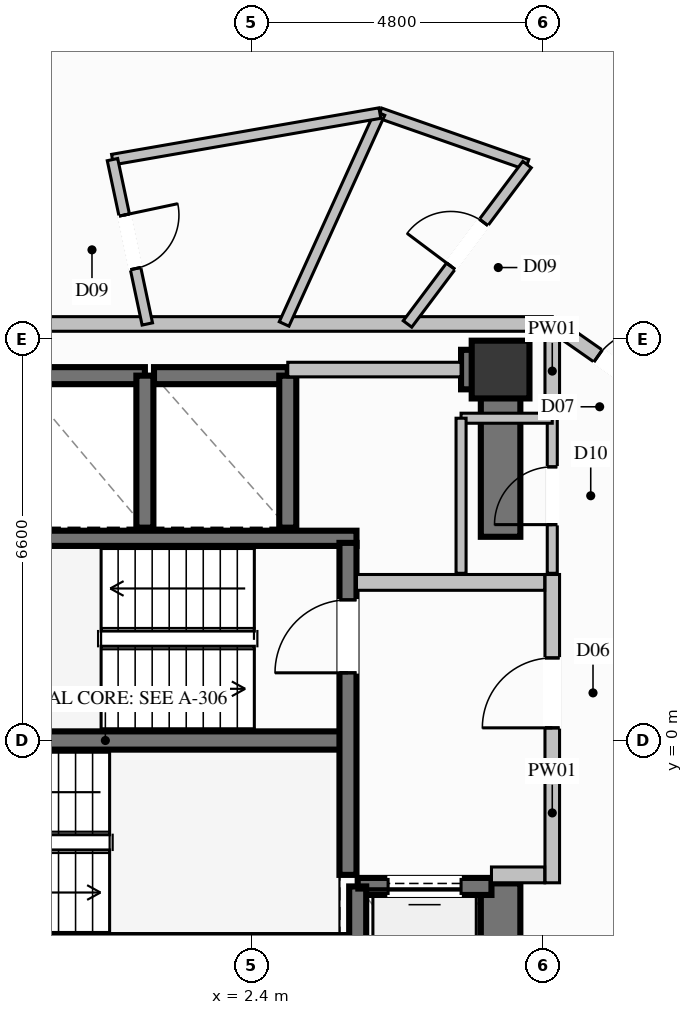
"""IFC4 building model, lengths in metres.
Left out: names, types, materials, properties, quantities, classifications, styles, units other than length and angle.
Written with IfcOpenShell. Run it as: python <this file> out.ifc"""

import sys

from ifc_helpers import new_model, si_unit, direction, frame, frame_2d, origin, origin_2d, place, context, subcontext, project, spatial, rectangle, extrude, element, fill, save


model = new_model("IFC4")
c1 = context("Model", 3, precision=1e-05, world=origin(), true_north=direction((0.0, 1.0)))
c2 = subcontext(c1, "Body", "Model", "MODEL_VIEW")
j1 = project(units=[si_unit("LENGTHUNIT", "METRE"), si_unit("PLANEANGLEUNIT", "RADIAN")], contexts=[c1])
p1 = place(None, origin())
s1 = spatial("IfcSite", under=j1, at=p1, CompositionType="ELEMENT")
p2 = place(p1, origin())
s2 = spatial("IfcBuilding", under=s1, at=p2, CompositionType="ELEMENT")
p3 = place(p2, frame((0.0, 0.0, 142.2)))
s3 = spatial("IfcBuildingStorey", under=s2, at=p3, CompositionType="ELEMENT", Elevation=142.2)
p4 = place(p3, frame((6.5, 6.1, 0.0), z_axis=(0.0, 0.0, 1.0), x_axis=(1.0, 0.0, 0.0)))
e1 = element("IfcColumn", 1, at=p4, inside=s3, PredefinedType="COLUMN", context=c2, shape_type="SweptSolid", body=[
    extrude(rectangle(XDim=0.95, YDim=0.95, at=origin_2d()), origin(), (0.0, 0.0, 1.0), 3.6),
])
p5 = place(p3, frame((-3.99, 0.0, 0.0), z_axis=(0.0, 0.0, 1.0), x_axis=(1.0, 0.0, 0.0)))
e2 = element("IfcWall", 2, at=p5, inside=s3, PredefinedType="SHEAR", context=c2, shape_type="SweptSolid", body=[
    extrude(rectangle(XDim=7.98, YDim=0.3, at=frame_2d((3.99, 0.0))), origin(), (0.0, 0.0, 1.0), 3.6),
])
for number, where, z_axis, x_axis in (
    (3, (-4.13, -3.325, 0.0), (0.0, 0.0, 1.0), (1.0, 0.0, 0.0)),
    (4, (-4.13, 3.325, 0.0), (0.0, 0.0, 1.0), (1.0, 0.0, 0.0)),
):
    element("IfcWall", number, at=place(p3, frame(where, z_axis=z_axis, x_axis=x_axis)), inside=s3, PredefinedType="SOLIDWALL", context=c2, shape_type="SweptSolid", body=[
        extrude(rectangle(XDim=8.26, YDim=0.25, at=frame_2d((4.13, 0.0))), origin(), (0.0, 0.0, 1.0), 3.6),
    ])
p6 = place(p3, frame((5.85, 6.1, 0.0), z_axis=(0.0, 0.0, 1.0), x_axis=(1.0, 0.0, 0.0)))
e5 = element("IfcWall", 5, at=p6, inside=s3, PredefinedType="SHEAR", context=c2, shape_type="SweptSolid", body=[
    extrude(rectangle(XDim=0.325, YDim=0.65, at=frame_2d((0.163, 0.0))), origin(), (0.0, 0.0, 1.0), 3.6),
])
p7 = place(p3, frame((6.5, -6.425, 0.0), z_axis=(0.0, 0.0, 1.0), x_axis=(0.0, 1.0, 0.0)))
e6 = element("IfcWall", 6, at=p7, inside=s3, PredefinedType="SHEAR", context=c2, shape_type="SweptSolid", body=[
    extrude(rectangle(XDim=4.075, YDim=0.65, at=frame_2d((2.038, 0.0))), origin(), (0.0, 0.0, 1.0), 3.6),
])
p8 = place(p3, frame((6.5, 3.35, 0.0), z_axis=(0.0, 0.0, 1.0), x_axis=(0.0, 1.0, 0.0)))
e7 = element("IfcWall", 7, at=p8, inside=s3, PredefinedType="SHEAR", context=c2, shape_type="SweptSolid", body=[
    extrude(rectangle(XDim=3.075, YDim=0.65, at=frame_2d((1.538, 0.0))), origin(), (0.0, 0.0, 1.0), 3.6),
])
p9 = place(p3, frame((0.65, 6.0, 0.0), z_axis=(0.0, 0.0, 1.0), x_axis=(-1.0, 0.0, 0.0)))
e8 = element("IfcWall", 8, at=p9, inside=s3, PredefinedType="SOLIDWALL", context=c2, shape_type="SweptSolid", body=[
    extrude(rectangle(XDim=2.1, YDim=0.28, at=frame_2d((1.05, 0.0))), origin(), (0.0, 0.0, 1.0), 3.35),
])
p10 = place(p3, frame((0.65, 3.5, 0.0), z_axis=(0.0, 0.0, 1.0), x_axis=(0.0, 1.0, 0.0)))
e9 = element("IfcWall", 9, at=p10, inside=s3, PredefinedType="SOLIDWALL", context=c2, shape_type="SweptSolid", body=[
    extrude(rectangle(XDim=2.5, YDim=0.28, at=frame_2d((1.25, 0.0))), origin(), (0.0, 0.0, 1.0), 3.35),
])
p11 = place(p3, frame((3.0, 6.0, 0.0), z_axis=(0.0, 0.0, 1.0), x_axis=(-1.0, 0.0, 0.0)))
e10 = element("IfcWall", 10, at=p11, inside=s3, PredefinedType="SOLIDWALL", context=c2, shape_type="SweptSolid", body=[
    extrude(rectangle(XDim=2.2, YDim=0.28, at=frame_2d((1.1, 0.0))), origin(), (0.0, 0.0, 1.0), 3.35),
])
p12 = place(p3, frame((3.0, 3.5, 0.0), z_axis=(0.0, 0.0, 1.0), x_axis=(0.0, 1.0, 0.0)))
e11 = element("IfcWall", 11, at=p12, inside=s3, PredefinedType="SOLIDWALL", context=c2, shape_type="SweptSolid", body=[
    extrude(rectangle(XDim=2.5, YDim=0.28, at=frame_2d((1.25, 0.0))), origin(), (0.0, 0.0, 1.0), 3.35),
])
p13 = place(p3, frame((6.35, -2.4, 0.0), z_axis=(0.0, 0.0, 1.0), x_axis=(-1.0, 0.0, 0.0)))
e12 = element("IfcWall", 12, at=p13, inside=s3, PredefinedType="SOLIDWALL", context=c2, shape_type="SweptSolid", body=[
    extrude(rectangle(XDim=2.2, YDim=0.28, at=frame_2d((1.1, 0.0))), origin(), (0.0, 0.0, 1.0), 3.35),
])
p14 = place(p13, frame((0.5, 0.0, 0.0)))
e13 = element("IfcOpeningElement", 13, at=p14, cuts=e12, PredefinedType="OPENING", context=c2, shape_type="SweptSolid", body=[
    extrude(rectangle(XDim=1.2, YDim=2.2, at=frame_2d((0.6, 1.1))), frame((0.0, 0.15, 0.0), z_axis=(0.0, -1.0, 0.0), x_axis=(1.0, 0.0, 0.0)), (0.0, 0.0, 1.0), 0.3),
])
p15 = place(p3, frame((4.15, -2.4, 0.0), z_axis=(0.0, 0.0, 1.0), x_axis=(0.0, -1.0, 0.0)))
e14 = element("IfcWall", 14, at=p15, inside=s3, PredefinedType="SOLIDWALL", context=c2, shape_type="SweptSolid", body=[
    extrude(rectangle(XDim=2.7, YDim=0.28, at=frame_2d((1.35, 0.0))), origin(), (0.0, 0.0, 1.0), 3.35),
])
p16 = place(p3, frame((3.99, -2.21, 0.0), z_axis=(0.0, 0.0, 1.0), x_axis=(0.0, 1.0, 0.0)))
e15 = element("IfcWall", 15, at=p16, inside=s3, PredefinedType="SOLIDWALL", context=c2, shape_type="SweptSolid", body=[
    extrude(rectangle(XDim=5.46, YDim=0.28, at=frame_2d((2.73, 0.0))), origin(), (0.0, 0.0, 1.0), 3.35),
])
p17 = place(p16, frame((3.323, 0.0, 0.0)))
e16 = element("IfcOpeningElement", 16, at=p17, cuts=e15, PredefinedType="OPENING", context=c2, shape_type="SweptSolid", body=[
    extrude(rectangle(XDim=1.2, YDim=2.2, at=frame_2d((0.6, 1.1))), frame((0.0, 0.15, 0.0), z_axis=(0.0, -1.0, 0.0), x_axis=(1.0, 0.0, 0.0)), (0.0, 0.0, 1.0), 0.3),
])
p18 = place(p3, frame((7.35, -2.34, 0.0), z_axis=(0.0, 0.0, 1.0), x_axis=(0.0, 1.0, 0.0)))
e17 = element("IfcWall", 17, at=p18, inside=s3, PredefinedType="PARTITIONING", context=c2, shape_type="SweptSolid", body=[
    extrude(rectangle(XDim=5.07, YDim=0.24, at=frame_2d((2.535, 0.0))), origin(), (0.0, 0.0, 1.0), 2.435),
])
p19 = place(p18, frame((2.548, 0.0, 0.0)))
e18 = element("IfcOpeningElement", 18, at=p19, cuts=e17, PredefinedType="OPENING", context=c2, shape_type="SweptSolid", body=[
    extrude(rectangle(XDim=1.15, YDim=2.2, at=frame_2d((0.575, 1.1))), frame((0.0, 0.13, 0.0), z_axis=(0.0, -1.0, 0.0), x_axis=(1.0, 0.0, 0.0)), (0.0, 0.0, 1.0), 0.26),
])
p20 = place(p3, frame((6.35, -2.21, 0.0), z_axis=(0.0, 0.0, 1.0), x_axis=(1.0, 0.0, 0.0)))
e19 = element("IfcWall", 19, at=p20, inside=s3, PredefinedType="PARTITIONING", context=c2, shape_type="SweptSolid", body=[
    extrude(rectangle(XDim=0.875, YDim=0.26, at=frame_2d((0.438, 0.0))), origin(), (0.0, 0.0, 1.0), 3.35),
])
p21 = place(p3, frame((4.13, 2.6, 0.0), z_axis=(0.0, 0.0, 1.0), x_axis=(1.0, 0.0, 0.0)))
e20 = element("IfcWall", 20, at=p21, inside=s3, PredefinedType="PARTITIONING", context=c2, shape_type="SweptSolid", body=[
    extrude(rectangle(XDim=3.095, YDim=0.26, at=frame_2d((1.548, 0.0))), origin(), (0.0, 0.0, 1.0), 3.35),
])
p22 = place(p3, frame((-7.35, 6.85, 0.0), z_axis=(0.0, 0.0, 1.0), x_axis=(1.0, 0.0, 0.0)))
e21 = element("IfcWall", 21, at=p22, inside=s3, PredefinedType="PARTITIONING", context=c2, shape_type="SweptSolid", body=[
    extrude(rectangle(XDim=14.7, YDim=0.24, at=frame_2d((7.35, 0.0))), origin(), (0.0, 0.0, 1.0), 2.435),
])
p23 = place(p3, frame((7.35, 5.3, 0.0), z_axis=(0.0, 0.0, 1.0), x_axis=(0.0, 1.0, 0.0)))
e22 = element("IfcWall", 22, at=p23, inside=s3, PredefinedType="PARTITIONING", context=c2, shape_type="SweptSolid", body=[
    extrude(rectangle(XDim=1.55, YDim=0.24, at=frame_2d((0.775, 0.0))), origin(), (0.0, 0.0, 1.0), 2.435),
])
p24 = place(p3, frame((3.0, 6.1, 0.0), z_axis=(0.0, 0.0, 1.0), x_axis=(1.0, 0.0, 0.0)))
e23 = element("IfcWall", 23, at=p24, inside=s3, PredefinedType="PARTITIONING", context=c2, shape_type="SweptSolid", body=[
    extrude(rectangle(XDim=2.85, YDim=0.24, at=frame_2d((1.425, 0.0))), origin(), (0.0, 0.0, 1.0), 2.435),
])
p25 = place(p3, frame((7.35, 2.75, 0.0), z_axis=(0.0, 0.0, 1.0), x_axis=(0.0, 1.0, 0.0)))
e24 = element("IfcWall", 24, at=p25, inside=s3, PredefinedType="PARTITIONING", context=c2, shape_type="SweptSolid", body=[
    extrude(rectangle(XDim=2.55, YDim=0.165, at=frame_2d((1.275, 0.0))), origin(), (0.0, 0.0, 1.0), 3.35),
])
p26 = place(p25, frame((0.8, 0.0, 0.0)))
e25 = element("IfcOpeningElement", 25, at=p26, cuts=e24, PredefinedType="OPENING", context=c2, shape_type="SweptSolid", body=[
    extrude(rectangle(XDim=0.95, YDim=2.1, at=frame_2d((0.475, 1.05))), frame((0.0, 0.093, 0.0), z_axis=(0.0, -1.0, 0.0), x_axis=(1.0, 0.0, 0.0)), (0.0, 0.0, 1.0), 0.185),
])
p27 = place(p3, frame((7.35, 5.3, 0.0), z_axis=(0.0, 0.0, 1.0), x_axis=(-1.0, 0.0, 0.0)))
e26 = element("IfcWall", 26, at=p27, inside=s3, PredefinedType="PARTITIONING", context=c2, shape_type="SweptSolid", body=[
    extrude(rectangle(XDim=1.5, YDim=0.165, at=frame_2d((0.75, 0.0))), origin(), (0.0, 0.0, 1.0), 2.435),
])
p28 = place(p3, frame((5.85, 5.3, 0.0), z_axis=(0.0, 0.0, 1.0), x_axis=(0.0, -1.0, 0.0)))
e27 = element("IfcWall", 27, at=p28, inside=s3, PredefinedType="PARTITIONING", context=c2, shape_type="SweptSolid", body=[
    extrude(rectangle(XDim=2.55, YDim=0.165, at=frame_2d((1.275, 0.0))), origin(), (0.0, 0.0, 1.0), 2.435),
])
p29 = place(p3, frame((4.515, 10.318, 0.0), z_axis=(0.0, 0.0, 1.0), x_axis=(0.943844996107, -0.330388594421, 0.0)))
e28 = element("IfcWall", 28, at=p29, inside=s3, PredefinedType="PLUMBINGWALL", context=c2, shape_type="SweptSolid", body=[
    extrude(rectangle(XDim=2.564, YDim=0.175, at=frame_2d((1.282, 0.0))), origin(), (0.0, 0.0, 1.0), 3.35),
])
p30 = place(p3, frame((4.515, 10.318, 0.0), z_axis=(0.0, 0.0, 1.0), x_axis=(-0.413493846923, -0.910506912965, 0.0)))
e29 = element("IfcWall", 29, at=p30, inside=s3, PredefinedType="PLUMBINGWALL", context=c2, shape_type="SweptSolid", body=[
    extrude(rectangle(XDim=3.809, YDim=0.175, at=frame_2d((1.904, 0.0))), origin(), (0.0, 0.0, 1.0), 3.35),
])
p31 = place(p3, frame((4.969, 6.85, 0.0), z_axis=(0.0, 0.0, 1.0), x_axis=(0.600083455504, 0.79993740157, 0.0)))
e30 = element("IfcWall", 30, at=p31, inside=s3, PredefinedType="PLUMBINGWALL", context=c2, shape_type="SweptSolid", body=[
    extrude(rectangle(XDim=3.276, YDim=0.175, at=frame_2d((1.638, 0.0))), origin(), (0.0, 0.0, 1.0), 2.718),
])
p32 = place(p31, frame((1.188, 0.0, 0.0)))
e31 = element("IfcOpeningElement", 31, at=p32, cuts=e30, PredefinedType="OPENING", context=c2, shape_type="SweptSolid", body=[
    extrude(rectangle(XDim=0.9, YDim=2.1, at=frame_2d((0.45, 1.05))), frame((0.0, 0.098, 0.0), z_axis=(0.0, -1.0, 0.0), x_axis=(1.0, 0.0, 0.0)), (0.0, 0.0, 1.0), 0.195),
])
p33 = place(p3, frame((7.35, 6.85, 0.0), z_axis=(0.0, 0.0, 1.0), x_axis=(0.819753050647, -0.57271715179, 0.0)))
e32 = element("IfcWall", 32, at=p33, inside=s3, PredefinedType="PARTITIONING", context=c2, shape_type="SweptSolid", body=[
    extrude(rectangle(XDim=2.837, YDim=0.24, at=frame_2d((1.419, 0.0))), origin(), (0.0, 0.0, 1.0), 3.35),
])
p34 = place(p33, frame((0.919, 0.0, 0.0)))
e33 = element("IfcOpeningElement", 33, at=p34, cuts=e32, PredefinedType="OPENING", context=c2, shape_type="SweptSolid", body=[
    extrude(rectangle(XDim=1.0, YDim=2.2, at=frame_2d((0.5, 1.1))), frame((0.0, 0.13, 0.0), z_axis=(0.0, -1.0, 0.0), x_axis=(1.0, 0.0, 0.0)), (0.0, 0.0, 1.0), 0.26),
])
p35 = place(p3, frame((0.117, 9.553, 0.0), z_axis=(0.0, 0.0, 1.0), x_axis=(0.985201316569, 0.171401183864, 0.0)))
e34 = element("IfcWall", 34, at=p35, inside=s3, PredefinedType="PLUMBINGWALL", context=c2, shape_type="SweptSolid", body=[
    extrude(rectangle(XDim=4.464, YDim=0.175, at=frame_2d((2.232, 0.0))), origin(), (0.0, 0.0, 1.0), 3.35),
])
p36 = place(p3, frame((0.117, 9.553, 0.0), z_axis=(0.0, 0.0, 1.0), x_axis=(0.207386338672, -0.978259120342, 0.0)))
e35 = element("IfcWall", 35, at=p36, inside=s3, PredefinedType="PLUMBINGWALL", context=c2, shape_type="SweptSolid", body=[
    extrude(rectangle(XDim=2.763, YDim=0.175, at=frame_2d((1.381, 0.0))), origin(), (0.0, 0.0, 1.0), 3.35),
])
p37 = place(p36, frame((0.932, 0.0, 0.0)))
e36 = element("IfcOpeningElement", 36, at=p37, cuts=e35, PredefinedType="OPENING", context=c2, shape_type="SweptSolid", body=[
    extrude(rectangle(XDim=0.9, YDim=2.1, at=frame_2d((0.45, 1.05))), frame((0.0, 0.098, 0.0), z_axis=(0.0, -1.0, 0.0), x_axis=(1.0, 0.0, 0.0)), (0.0, 0.0, 1.0), 0.195),
])
p38 = place(p14, origin())
e37 = element("IfcDoor", 37, at=p38, inside=s3, OperationType="SLIDING_TO_LEFT", PredefinedType="DOOR", context=c2, shape_type="SweptSolid", body=[
    extrude(rectangle(XDim=1.2, YDim=2.2, at=frame_2d((0.6, 1.1))), frame((0.0, 0.025, 0.0), z_axis=(0.0, -1.0, 0.0), x_axis=(1.0, 0.0, 0.0)), (0.0, 0.0, 1.0), 0.05),
])
fill(e13, e37)
p39 = place(p17, origin())
e38 = element("IfcDoor", 38, at=p39, inside=s3, OperationType="SINGLE_SWING_LEFT", PredefinedType="DOOR", context=c2, shape_type="SweptSolid", body=[
    extrude(rectangle(XDim=1.2, YDim=2.2, at=frame_2d((0.6, 1.1))), frame((0.0, 0.025, 0.0), z_axis=(0.0, -1.0, 0.0), x_axis=(1.0, 0.0, 0.0)), (0.0, 0.0, 1.0), 0.05),
])
fill(e16, e38)
p40 = place(p19, origin())
e39 = element("IfcDoor", 39, at=p40, inside=s3, OperationType="SINGLE_SWING_LEFT", PredefinedType="DOOR", context=c2, shape_type="SweptSolid", body=[
    extrude(rectangle(XDim=1.15, YDim=2.2, at=frame_2d((0.575, 1.1))), frame((0.0, 0.025, 0.0), z_axis=(0.0, -1.0, 0.0), x_axis=(1.0, 0.0, 0.0)), (0.0, 0.0, 1.0), 0.05),
])
fill(e18, e39)
p41 = place(p26, origin())
e40 = element("IfcDoor", 40, at=p41, inside=s3, OperationType="SINGLE_SWING_LEFT", PredefinedType="DOOR", context=c2, shape_type="SweptSolid", body=[
    extrude(rectangle(XDim=0.95, YDim=2.1, at=frame_2d((0.475, 1.05))), frame((0.0, 0.025, 0.0), z_axis=(0.0, -1.0, 0.0), x_axis=(1.0, 0.0, 0.0)), (0.0, 0.0, 1.0), 0.05),
])
fill(e25, e40)
p42 = place(p32, origin())
e41 = element("IfcDoor", 41, at=p42, inside=s3, OperationType="SINGLE_SWING_LEFT", PredefinedType="DOOR", context=c2, shape_type="SweptSolid", body=[
    extrude(rectangle(XDim=0.9, YDim=2.1, at=frame_2d((0.45, 1.05))), frame((0.0, 0.025, 0.0), z_axis=(0.0, -1.0, 0.0), x_axis=(1.0, 0.0, 0.0)), (0.0, 0.0, 1.0), 0.05),
])
fill(e31, e41)
p43 = place(p34, origin())
e42 = element("IfcDoor", 42, at=p43, inside=s3, OperationType="SINGLE_SWING_RIGHT", PredefinedType="DOOR", context=c2, shape_type="SweptSolid", body=[
    extrude(rectangle(XDim=1.0, YDim=2.2, at=frame_2d((0.5, 1.1))), frame((0.0, 0.025, 0.0), z_axis=(0.0, -1.0, 0.0), x_axis=(1.0, 0.0, 0.0)), (0.0, 0.0, 1.0), 0.05),
])
fill(e33, e42)
p44 = place(p37, origin())
e43 = element("IfcDoor", 43, at=p44, inside=s3, OperationType="SINGLE_SWING_LEFT", PredefinedType="DOOR", context=c2, shape_type="SweptSolid", body=[
    extrude(rectangle(XDim=0.9, YDim=2.1, at=frame_2d((0.45, 1.05))), frame((0.0, 0.025, 0.0), z_axis=(0.0, -1.0, 0.0), x_axis=(1.0, 0.0, 0.0)), (0.0, 0.0, 1.0), 0.05),
])
fill(e36, e43)
save(model, sys.argv[1])
